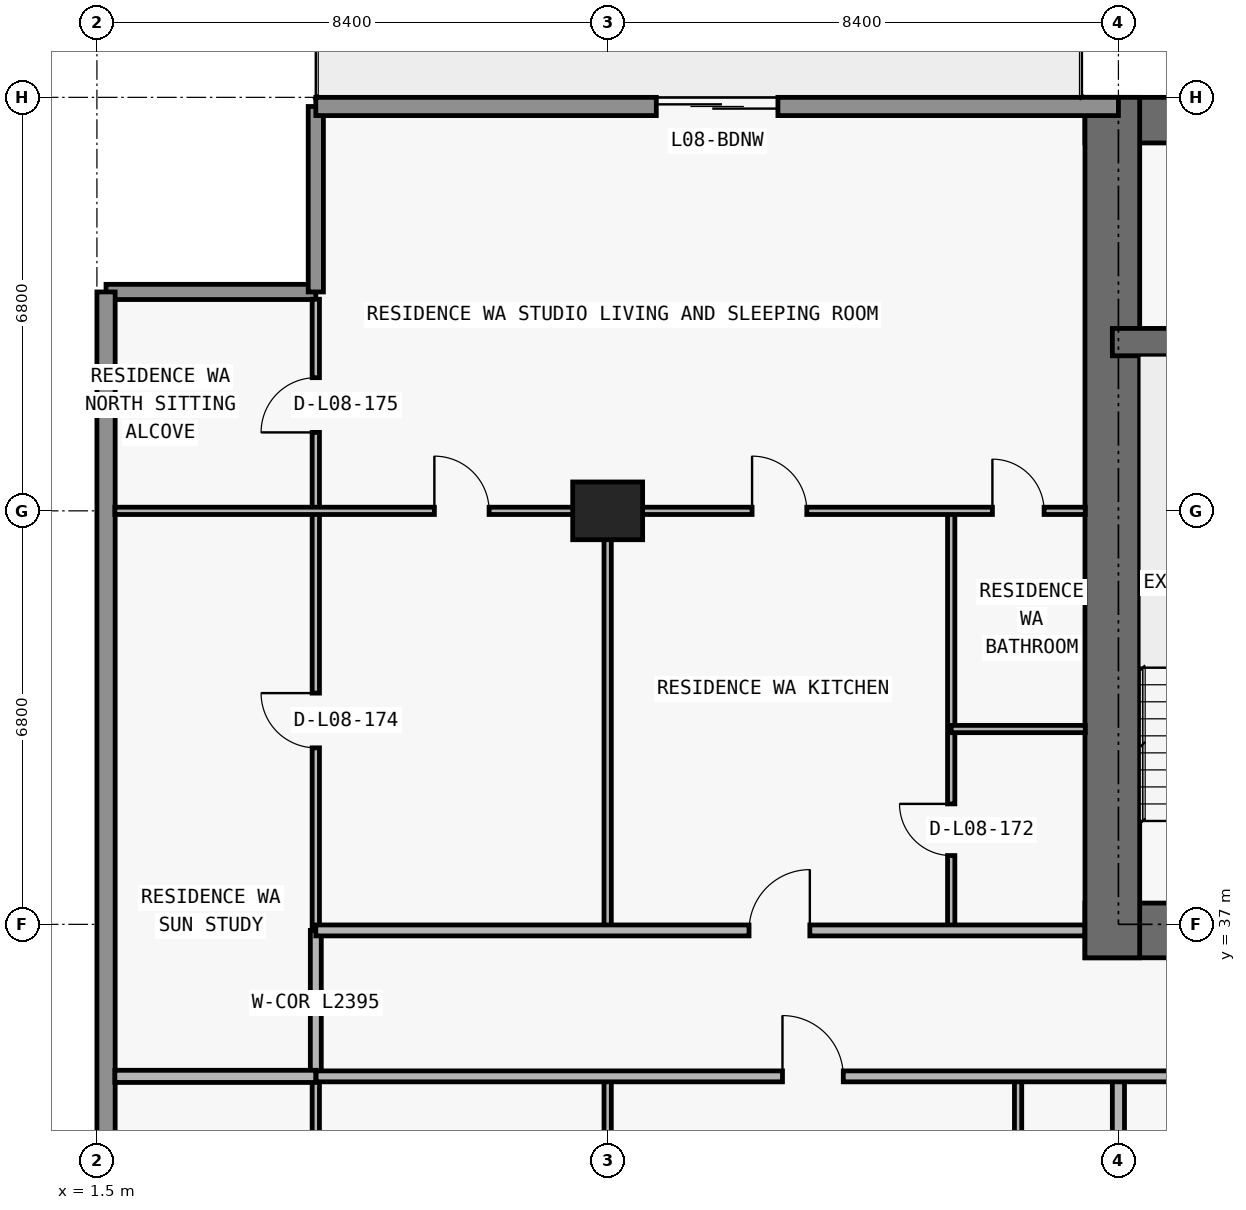
"""IFC4 building model, lengths in metres.
Left out: names, types, materials, properties, quantities, classifications, styles, units other than length and angle.
Written with IfcOpenShell. Run it as: python <this file> out.ifc"""

import sys

from ifc_helpers import new_model, si_unit, direction, frame, frame_2d, origin, origin_2d, place, context, subcontext, project, spatial, rectangle, extrude, element, fill, save


model = new_model("IFC4")
c1 = context("Model", 3, precision=1e-05, world=origin(), true_north=direction((0.0, 1.0)))
c2 = subcontext(c1, "Body", "Model", "MODEL_VIEW")
j1 = project(units=[si_unit("LENGTHUNIT", "METRE"), si_unit("PLANEANGLEUNIT", "RADIAN")], contexts=[c1])
p1 = place(None, origin())
s1 = spatial("IfcSite", under=j1, at=p1, CompositionType="ELEMENT")
p2 = place(p1, origin())
s2 = spatial("IfcBuilding", under=s1, at=p2, CompositionType="ELEMENT")
p3 = place(p2, frame((0.0, 0.0, 36.6)))
s3 = spatial("IfcBuildingStorey", under=s2, at=p3, CompositionType="ELEMENT", Elevation=36.6)
p4 = place(p3, frame((9.9, 43.8, 0.0), z_axis=(0.0, 0.0, 1.0), x_axis=(1.0, 0.0, 0.0)))
e1 = element("IfcColumn", 1, at=p4, inside=s3, PredefinedType="COLUMN", context=c2, shape_type="SweptSolid", body=[
    extrude(rectangle(XDim=1.15, YDim=0.95, at=origin_2d()), origin(), (0.0, 0.0, 1.0), 3.05),
])
p5 = place(p3, frame((17.75, 36.9, 0.0), z_axis=(0.0, 0.0, 1.0), x_axis=(1.0, 0.0, 0.0)))
e2 = element("IfcWall", 2, at=p5, inside=s3, PredefinedType="SHEAR", context=c2, shape_type="SweptSolid", body=[
    extrude(rectangle(XDim=42.3, YDim=0.9, at=frame_2d((21.15, 0.0))), origin(), (0.0, 0.0, 1.0), 3.05),
])
p6 = place(p5, frame((14.55, 0.0, 0.0)))
e3 = element("IfcOpeningElement", 3, at=p6, cuts=e2, PredefinedType="OPENING", context=c2, shape_type="SweptSolid", body=[
    extrude(rectangle(XDim=1.1, YDim=2.15, at=frame_2d((0.55, 1.075))), frame((0.0, 0.46, 0.0), z_axis=(0.0, -1.0, 0.0), x_axis=(1.0, 0.0, 0.0)), (0.0, 0.0, 1.0), 0.92),
])
p7 = place(p5, frame((6.4, 0.0, 0.0)))
e4 = element("IfcOpeningElement", 4, at=p7, cuts=e2, PredefinedType="OPENING", context=c2, shape_type="SweptSolid", body=[
    extrude(rectangle(XDim=1.05, YDim=2.15, at=frame_2d((0.525, 1.075))), frame((0.0, 0.46, 0.0), z_axis=(0.0, -1.0, 0.0), x_axis=(1.0, 0.0, 0.0)), (0.0, 0.0, 1.0), 0.92),
])
p8 = place(p5, frame((34.9, 0.0, 0.0)))
e5 = element("IfcOpeningElement", 5, at=p8, cuts=e2, PredefinedType="OPENING", context=c2, shape_type="SweptSolid", body=[
    extrude(rectangle(XDim=1.05, YDim=2.15, at=frame_2d((0.525, 1.075))), frame((0.0, 0.46, 0.0), z_axis=(0.0, -1.0, 0.0), x_axis=(1.0, 0.0, 0.0)), (0.0, 0.0, 1.0), 0.92),
])
p9 = place(p5, frame((11.012, 0.0, 0.0)))
e6 = element("IfcOpeningElement", 6, at=p9, cuts=e2, PredefinedType="OPENING", context=c2, shape_type="SweptSolid", body=[
    extrude(rectangle(XDim=1.05, YDim=2.15, at=frame_2d((0.525, 1.075))), frame((0.0, 0.46, 0.0), z_axis=(0.0, -1.0, 0.0), x_axis=(1.0, 0.0, 0.0)), (0.0, 0.0, 1.0), 0.92),
])
p10 = place(p5, frame((24.25, 0.0, 0.0)))
e7 = element("IfcOpeningElement", 7, at=p10, cuts=e2, PredefinedType="OPENING", context=c2, shape_type="SweptSolid", body=[
    extrude(rectangle(XDim=1.05, YDim=2.15, at=frame_2d((0.525, 1.075))), frame((0.0, 0.46, 0.0), z_axis=(0.0, -1.0, 0.0), x_axis=(1.0, 0.0, 0.0)), (0.0, 0.0, 1.0), 0.92),
])
p11 = place(p3, frame((17.75, 50.225, 0.0), z_axis=(0.0, 0.0, 1.0), x_axis=(1.0, 0.0, 0.0)))
e8 = element("IfcWall", 8, at=p11, inside=s3, PredefinedType="SHEAR", context=c2, shape_type="SweptSolid", body=[
    extrude(rectangle(XDim=42.3, YDim=0.75, at=frame_2d((21.15, 0.0))), origin(), (0.0, 0.0, 1.0), 3.05),
])
p12 = place(p3, frame((18.2, 36.45, 0.0), z_axis=(0.0, 0.0, 1.0), x_axis=(0.0, 1.0, 0.0)))
e9 = element("IfcWall", 9, at=p12, inside=s3, PredefinedType="SHEAR", context=c2, shape_type="SweptSolid", body=[
    extrude(rectangle(XDim=14.15, YDim=0.9, at=frame_2d((7.075, 0.0))), origin(), (0.0, 0.0, 1.0), 3.05),
])
p13 = place(p3, frame((18.2, 46.575, 0.0), z_axis=(0.0, 0.0, 1.0), x_axis=(1.0, 0.0, 0.0)))
e10 = element("IfcWall", 10, at=p13, inside=s3, PredefinedType="SHEAR", context=c2, shape_type="SweptSolid", body=[
    extrude(rectangle(XDim=41.4, YDim=0.45, at=frame_2d((20.7, 0.0))), origin(), (0.0, 0.0, 1.0), 3.05),
])
p14 = place(p13, frame((7.7, 0.0, 0.0)))
e11 = element("IfcOpeningElement", 11, at=p14, cuts=e10, PredefinedType="OPENING", context=c2, shape_type="SweptSolid", body=[
    extrude(rectangle(XDim=1.0, YDim=2.2, at=frame_2d((0.5, 1.1))), frame((0.0, 0.235, 0.0), z_axis=(0.0, -1.0, 0.0), x_axis=(1.0, 0.0, 0.0)), (0.0, 0.0, 1.0), 0.47),
])
p15 = place(p13, frame((32.725, 0.0, 0.0)))
e12 = element("IfcOpeningElement", 12, at=p15, cuts=e10, PredefinedType="OPENING", context=c2, shape_type="SweptSolid", body=[
    extrude(rectangle(XDim=1.05, YDim=2.15, at=frame_2d((0.525, 1.075))), frame((0.0, 0.235, 0.0), z_axis=(0.0, -1.0, 0.0), x_axis=(1.0, 0.0, 0.0)), (0.0, 0.0, 1.0), 0.47),
])
p16 = place(p3, frame((1.65, 47.4, 0.0), z_axis=(0.0, 0.0, 1.0), x_axis=(1.0, 0.0, 0.0)))
e13 = element("IfcWall", 13, at=p16, inside=s3, PredefinedType="ELEMENTEDWALL", context=c2, shape_type="SweptSolid", body=[
    extrude(rectangle(XDim=3.45, YDim=0.25, at=frame_2d((1.725, 0.0))), origin(), (0.0, 0.0, 1.0), 3.05),
])
p17 = place(p3, frame((5.1, 47.4, 0.0), z_axis=(0.0, 0.0, 1.0), x_axis=(0.0, 1.0, 0.0)))
e14 = element("IfcWall", 14, at=p17, inside=s3, PredefinedType="ELEMENTEDWALL", context=c2, shape_type="SweptSolid", body=[
    extrude(rectangle(XDim=3.05, YDim=0.25, at=frame_2d((1.525, 0.0))), origin(), (0.0, 0.0, 1.0), 3.05),
])
p18 = place(p3, frame((1.65, 26.8, 0.0), z_axis=(0.0, 0.0, 1.0), x_axis=(0.0, 1.0, 0.0)))
e15 = element("IfcWall", 15, at=p18, inside=s3, PredefinedType="STANDARD", context=c2, shape_type="SweptSolid", body=[
    extrude(rectangle(XDim=20.6, YDim=0.3, at=frame_2d((10.3, 0.0))), origin(), (0.0, 0.0, 1.0), 3.05),
])
p19 = place(p3, frame((5.1, 50.45, 0.0), z_axis=(0.0, 0.0, 1.0), x_axis=(1.0, 0.0, 0.0)))
e16 = element("IfcWall", 16, at=p19, inside=s3, PredefinedType="STANDARD", context=c2, shape_type="SweptSolid", body=[
    extrude(rectangle(XDim=13.2, YDim=0.3, at=frame_2d((6.6, 0.0))), origin(), (0.0, 0.0, 1.0), 3.05),
])
p20 = place(p19, frame((5.6, 0.0, 0.0)))
e17 = element("IfcOpeningElement", 17, at=p20, cuts=e16, PredefinedType="OPENING", context=c2, shape_type="SweptSolid", body=[
    extrude(rectangle(XDim=2.0, YDim=2.3, at=frame_2d((1.0, 1.15))), frame((0.0, 0.16, 0.0), z_axis=(0.0, -1.0, 0.0), x_axis=(1.0, 0.0, 0.0)), (0.0, 0.0, 1.0), 0.32),
])
p21 = place(p3, frame((5.1, 27.64, 0.0), z_axis=(0.0, 0.0, 1.0), x_axis=(0.0, 1.0, 0.0)))
e18 = element("IfcWall", 18, at=p21, inside=s3, PredefinedType="PARTITIONING", context=c2, shape_type="SweptSolid", body=[
    extrude(rectangle(XDim=6.86, YDim=0.12, at=frame_2d((3.43, 0.0))), origin(), (0.0, 0.0, 1.0), 3.05),
])
p22 = place(p3, frame((5.1, 34.505, 0.0), z_axis=(0.0, 0.0, 1.0), x_axis=(0.0, 1.0, 0.0)))
e19 = element("IfcWall", 19, at=p22, inside=s3, PredefinedType="PARTITIONING", context=c2, shape_type="SweptSolid", body=[
    extrude(rectangle(XDim=2.395, YDim=0.18, at=frame_2d((1.198, 0.0))), origin(), (0.0, 0.0, 1.0), 3.05),
])
p23 = place(p3, frame((5.1, 36.905, 0.0), z_axis=(0.0, 0.0, 1.0), x_axis=(0.0, 1.0, 0.0)))
e20 = element("IfcWall", 20, at=p23, inside=s3, PredefinedType="PARTITIONING", context=c2, shape_type="SweptSolid", body=[
    extrude(rectangle(XDim=10.375, YDim=0.12, at=frame_2d((5.188, 0.0))), origin(), (0.0, 0.0, 1.0), 3.05),
])
p24 = place(p23, frame((2.998, 0.0, 0.0)))
e21 = element("IfcOpeningElement", 21, at=p24, cuts=e20, PredefinedType="OPENING", context=c2, shape_type="SweptSolid", body=[
    extrude(rectangle(XDim=0.9, YDim=2.15, at=frame_2d((0.45, 1.075))), frame((0.0, 0.07, 0.0), z_axis=(0.0, -1.0, 0.0), x_axis=(1.0, 0.0, 0.0)), (0.0, 0.0, 1.0), 0.14),
])
p25 = place(p23, frame((8.185, 0.0, 0.0)))
e22 = element("IfcOpeningElement", 22, at=p25, cuts=e20, PredefinedType="OPENING", context=c2, shape_type="SweptSolid", body=[
    extrude(rectangle(XDim=0.9, YDim=2.15, at=frame_2d((0.45, 1.075))), frame((0.0, 0.07, 0.0), z_axis=(0.0, -1.0, 0.0), x_axis=(1.0, 0.0, 0.0)), (0.0, 0.0, 1.0), 0.14),
])
p26 = place(p3, frame((9.9, 27.64, 0.0), z_axis=(0.0, 0.0, 1.0), x_axis=(0.0, 1.0, 0.0)))
e23 = element("IfcWall", 23, at=p26, inside=s3, PredefinedType="PARTITIONING", context=c2, shape_type="SweptSolid", body=[
    extrude(rectangle(XDim=6.86, YDim=0.12, at=frame_2d((3.43, 0.0))), origin(), (0.0, 0.0, 1.0), 2.11),
])
p27 = place(p3, frame((9.9, 36.9, 0.0), z_axis=(0.0, 0.0, 1.0), x_axis=(0.0, 1.0, 0.0)))
e24 = element("IfcWall", 24, at=p27, inside=s3, PredefinedType="PARTITIONING", context=c2, shape_type="SweptSolid", body=[
    extrude(rectangle(XDim=6.9, YDim=0.12, at=frame_2d((3.45, 0.0))), origin(), (0.0, 0.0, 1.0), 2.11),
])
p28 = place(p3, frame((15.55, 36.9, 0.0), z_axis=(0.0, 0.0, 1.0), x_axis=(0.0, 1.0, 0.0)))
e25 = element("IfcWall", 25, at=p28, inside=s3, PredefinedType="PARTITIONING", context=c2, shape_type="SweptSolid", body=[
    extrude(rectangle(XDim=6.9, YDim=0.12, at=frame_2d((3.45, 0.0))), origin(), (0.0, 0.0, 1.0), 2.499),
])
p29 = place(p28, frame((1.231, 0.0, 0.0)))
e26 = element("IfcOpeningElement", 26, at=p29, cuts=e25, PredefinedType="OPENING", context=c2, shape_type="SweptSolid", body=[
    extrude(rectangle(XDim=0.85, YDim=2.1, at=frame_2d((0.425, 1.05))), frame((0.0, 0.07, 0.0), z_axis=(0.0, -1.0, 0.0), x_axis=(1.0, 0.0, 0.0)), (0.0, 0.0, 1.0), 0.14),
])
p30 = place(p3, frame((16.65, 27.64, 0.0), z_axis=(0.0, 0.0, 1.0), x_axis=(0.0, 1.0, 0.0)))
e27 = element("IfcWall", 27, at=p30, inside=s3, PredefinedType="PARTITIONING", context=c2, shape_type="SweptSolid", body=[
    extrude(rectangle(XDim=6.86, YDim=0.12, at=frame_2d((3.43, 0.0))), origin(), (0.0, 0.0, 1.0), 3.05),
])
p31 = place(p30, frame((3.005, 0.0, 0.0)))
e28 = element("IfcOpeningElement", 28, at=p31, cuts=e27, PredefinedType="OPENING", context=c2, shape_type="SweptSolid", body=[
    extrude(rectangle(XDim=0.85, YDim=2.1, at=frame_2d((0.425, 1.05))), frame((0.0, 0.07, 0.0), z_axis=(0.0, -1.0, 0.0), x_axis=(1.0, 0.0, 0.0)), (0.0, 0.0, 1.0), 0.14),
])
p32 = place(p3, frame((18.3, 27.64, 0.0), z_axis=(0.0, 0.0, 1.0), x_axis=(0.0, 1.0, 0.0)))
e29 = element("IfcWall", 29, at=p32, inside=s3, PredefinedType="PARTITIONING", context=c2, shape_type="SweptSolid", body=[
    extrude(rectangle(XDim=6.86, YDim=0.2, at=frame_2d((3.43, 0.0))), origin(), (0.0, 0.0, 1.0), 2.11),
])
p33 = place(p3, frame((1.795, 34.5, 0.0), z_axis=(0.0, 0.0, 1.0), x_axis=(1.0, 0.0, 0.0)))
e30 = element("IfcWall", 30, at=p33, inside=s3, PredefinedType="PARTITIONING", context=c2, shape_type="SweptSolid", body=[
    extrude(rectangle(XDim=3.305, YDim=0.2, at=frame_2d((1.653, 0.0))), origin(), (0.0, 0.0, 1.0), 3.05),
])
p34 = place(p3, frame((5.105, 34.5, 0.0), z_axis=(0.0, 0.0, 1.0), x_axis=(1.0, 0.0, 0.0)))
e31 = element("IfcWall", 31, at=p34, inside=s3, PredefinedType="PARTITIONING", context=c2, shape_type="SweptSolid", body=[
    extrude(rectangle(XDim=50.781, YDim=0.18, at=frame_2d((25.391, 0.0))), origin(), (0.0, 0.0, 1.0), 3.05),
])
p35 = place(p34, frame((7.67, 0.0, 0.0)))
e32 = element("IfcOpeningElement", 32, at=p35, cuts=e31, PredefinedType="OPENING", context=c2, shape_type="SweptSolid", body=[
    extrude(rectangle(XDim=1.0, YDim=2.2, at=frame_2d((0.5, 1.1))), frame((0.0, 0.1, 0.0), z_axis=(0.0, -1.0, 0.0), x_axis=(1.0, 0.0, 0.0)), (0.0, 0.0, 1.0), 0.2),
])
p36 = place(p34, frame((16.07, 0.0, 0.0)))
e33 = element("IfcOpeningElement", 33, at=p36, cuts=e31, PredefinedType="OPENING", context=c2, shape_type="SweptSolid", body=[
    extrude(rectangle(XDim=1.0, YDim=2.2, at=frame_2d((0.5, 1.1))), frame((0.0, 0.1, 0.0), z_axis=(0.0, -1.0, 0.0), x_axis=(1.0, 0.0, 0.0)), (0.0, 0.0, 1.0), 0.2),
])
p37 = place(p34, frame((24.47, 0.0, 0.0)))
e34 = element("IfcOpeningElement", 34, at=p37, cuts=e31, PredefinedType="OPENING", context=c2, shape_type="SweptSolid", body=[
    extrude(rectangle(XDim=1.0, YDim=2.2, at=frame_2d((0.5, 1.1))), frame((0.0, 0.1, 0.0), z_axis=(0.0, -1.0, 0.0), x_axis=(1.0, 0.0, 0.0)), (0.0, 0.0, 1.0), 0.2),
])
p38 = place(p34, frame((32.545, 0.0, 0.0)))
e35 = element("IfcOpeningElement", 35, at=p38, cuts=e31, PredefinedType="OPENING", context=c2, shape_type="SweptSolid", body=[
    extrude(rectangle(XDim=1.0, YDim=2.2, at=frame_2d((0.5, 1.1))), frame((0.0, 0.1, 0.0), z_axis=(0.0, -1.0, 0.0), x_axis=(1.0, 0.0, 0.0)), (0.0, 0.0, 1.0), 0.2),
])
p39 = place(p34, frame((47.888, 0.0, 0.0)))
e36 = element("IfcOpeningElement", 36, at=p39, cuts=e31, PredefinedType="OPENING", context=c2, shape_type="SweptSolid", body=[
    extrude(rectangle(XDim=1.0, YDim=2.2, at=frame_2d((0.5, 1.1))), frame((0.0, 0.1, 0.0), z_axis=(0.0, -1.0, 0.0), x_axis=(1.0, 0.0, 0.0)), (0.0, 0.0, 1.0), 0.2),
])
p40 = place(p3, frame((5.1, 36.9, 0.0), z_axis=(0.0, 0.0, 1.0), x_axis=(1.0, 0.0, 0.0)))
e37 = element("IfcWall", 37, at=p40, inside=s3, PredefinedType="PARTITIONING", context=c2, shape_type="SweptSolid", body=[
    extrude(rectangle(XDim=12.645, YDim=0.18, at=frame_2d((6.323, 0.0))), origin(), (0.0, 0.0, 1.0), 3.05),
])
p41 = place(p40, frame((7.125, 0.0, 0.0)))
e38 = element("IfcOpeningElement", 38, at=p41, cuts=e37, PredefinedType="OPENING", context=c2, shape_type="SweptSolid", body=[
    extrude(rectangle(XDim=1.0, YDim=2.2, at=frame_2d((0.5, 1.1))), frame((0.0, 0.1, 0.0), z_axis=(0.0, -1.0, 0.0), x_axis=(1.0, 0.0, 0.0)), (0.0, 0.0, 1.0), 0.2),
])
p42 = place(p3, frame((15.55, 40.212, 0.0), z_axis=(0.0, 0.0, 1.0), x_axis=(1.0, 0.0, 0.0)))
e39 = element("IfcWall", 39, at=p42, inside=s3, PredefinedType="PARTITIONING", context=c2, shape_type="SweptSolid", body=[
    extrude(rectangle(XDim=2.205, YDim=0.12, at=frame_2d((1.103, 0.0))), origin(), (0.0, 0.0, 1.0), 3.05),
])
p43 = place(p3, frame((1.795, 43.8, 0.0), z_axis=(0.0, 0.0, 1.0), x_axis=(1.0, 0.0, 0.0)))
e40 = element("IfcWall", 40, at=p43, inside=s3, PredefinedType="PARTITIONING", context=c2, shape_type="SweptSolid", body=[
    extrude(rectangle(XDim=15.96, YDim=0.12, at=frame_2d((7.98, 0.0))), origin(), (0.0, 0.0, 1.0), 2.339),
])
p44 = place(p43, frame((5.255, 0.0, 0.0)))
e41 = element("IfcOpeningElement", 41, at=p44, cuts=e40, PredefinedType="OPENING", context=c2, shape_type="SweptSolid", body=[
    extrude(rectangle(XDim=0.9, YDim=2.15, at=frame_2d((0.45, 1.075))), frame((0.0, 0.07, 0.0), z_axis=(0.0, -1.0, 0.0), x_axis=(1.0, 0.0, 0.0)), (0.0, 0.0, 1.0), 0.14),
])
p45 = place(p43, frame((10.48, 0.0, 0.0)))
e42 = element("IfcOpeningElement", 42, at=p45, cuts=e40, PredefinedType="OPENING", context=c2, shape_type="SweptSolid", body=[
    extrude(rectangle(XDim=0.9, YDim=2.15, at=frame_2d((0.45, 1.075))), frame((0.0, 0.07, 0.0), z_axis=(0.0, -1.0, 0.0), x_axis=(1.0, 0.0, 0.0)), (0.0, 0.0, 1.0), 0.14),
])
p46 = place(p43, frame((14.433, 0.0, 0.0)))
e43 = element("IfcOpeningElement", 43, at=p46, cuts=e40, PredefinedType="OPENING", context=c2, shape_type="SweptSolid", body=[
    extrude(rectangle(XDim=0.85, YDim=2.1, at=frame_2d((0.425, 1.05))), frame((0.0, 0.07, 0.0), z_axis=(0.0, -1.0, 0.0), x_axis=(1.0, 0.0, 0.0)), (0.0, 0.0, 1.0), 0.14),
])
p47 = place(p20, origin())
e44 = element("IfcDoor", 44, at=p47, inside=s3, OperationType="DOUBLE_DOOR_SLIDING", PredefinedType="DOOR", context=c2, shape_type="SweptSolid", body=[
    extrude(rectangle(XDim=2.0, YDim=2.3, at=frame_2d((1.0, 1.15))), frame((0.0, 0.025, 0.0), z_axis=(0.0, -1.0, 0.0), x_axis=(1.0, 0.0, 0.0)), (0.0, 0.0, 1.0), 0.05),
])
fill(e17, e44)
p48 = place(p35, origin())
e45 = element("IfcDoor", 45, at=p48, inside=s3, OperationType="SINGLE_SWING_LEFT", PredefinedType="DOOR", context=c2, shape_type="SweptSolid", body=[
    extrude(rectangle(XDim=1.0, YDim=2.2, at=frame_2d((0.5, 1.1))), frame((0.0, 0.025, 0.0), z_axis=(0.0, -1.0, 0.0), x_axis=(1.0, 0.0, 0.0)), (0.0, 0.0, 1.0), 0.05),
])
fill(e32, e45)
p49 = place(p44, origin())
e46 = element("IfcDoor", 46, at=p49, inside=s3, OperationType="SINGLE_SWING_LEFT", PredefinedType="DOOR", context=c2, shape_type="SweptSolid", body=[
    extrude(rectangle(XDim=0.9, YDim=2.15, at=frame_2d((0.45, 1.075))), frame((0.0, 0.025, 0.0), z_axis=(0.0, -1.0, 0.0), x_axis=(1.0, 0.0, 0.0)), (0.0, 0.0, 1.0), 0.05),
])
fill(e41, e46)
p50 = place(p41, origin())
e47 = element("IfcDoor", 47, at=p50, inside=s3, OperationType="SINGLE_SWING_RIGHT", PredefinedType="DOOR", context=c2, shape_type="SweptSolid", body=[
    extrude(rectangle(XDim=1.0, YDim=2.2, at=frame_2d((0.5, 1.1))), frame((0.0, 0.025, 0.0), z_axis=(0.0, -1.0, 0.0), x_axis=(1.0, 0.0, 0.0)), (0.0, 0.0, 1.0), 0.05),
])
fill(e38, e47)
p51 = place(p45, origin())
e48 = element("IfcDoor", 48, at=p51, inside=s3, OperationType="SINGLE_SWING_LEFT", PredefinedType="DOOR", context=c2, shape_type="SweptSolid", body=[
    extrude(rectangle(XDim=0.9, YDim=2.15, at=frame_2d((0.45, 1.075))), frame((0.0, 0.025, 0.0), z_axis=(0.0, -1.0, 0.0), x_axis=(1.0, 0.0, 0.0)), (0.0, 0.0, 1.0), 0.05),
])
fill(e42, e48)
p52 = place(p29, origin())
e49 = element("IfcDoor", 49, at=p52, inside=s3, OperationType="SINGLE_SWING_RIGHT", PredefinedType="DOOR", context=c2, shape_type="SweptSolid", body=[
    extrude(rectangle(XDim=0.85, YDim=2.1, at=frame_2d((0.425, 1.05))), frame((0.0, 0.025, 0.0), z_axis=(0.0, -1.0, 0.0), x_axis=(1.0, 0.0, 0.0)), (0.0, 0.0, 1.0), 0.05),
])
fill(e26, e49)
p53 = place(p46, origin())
e50 = element("IfcDoor", 50, at=p53, inside=s3, OperationType="SINGLE_SWING_LEFT", PredefinedType="DOOR", context=c2, shape_type="SweptSolid", body=[
    extrude(rectangle(XDim=0.85, YDim=2.1, at=frame_2d((0.425, 1.05))), frame((0.0, 0.025, 0.0), z_axis=(0.0, -1.0, 0.0), x_axis=(1.0, 0.0, 0.0)), (0.0, 0.0, 1.0), 0.05),
])
fill(e43, e50)
p54 = place(p24, origin())
e51 = element("IfcDoor", 51, at=p54, inside=s3, OperationType="SINGLE_SWING_RIGHT", PredefinedType="DOOR", context=c2, shape_type="SweptSolid", body=[
    extrude(rectangle(XDim=0.9, YDim=2.15, at=frame_2d((0.45, 1.075))), frame((0.0, 0.025, 0.0), z_axis=(0.0, -1.0, 0.0), x_axis=(1.0, 0.0, 0.0)), (0.0, 0.0, 1.0), 0.05),
])
fill(e21, e51)
p55 = place(p25, origin())
e52 = element("IfcDoor", 52, at=p55, inside=s3, OperationType="SINGLE_SWING_LEFT", PredefinedType="DOOR", context=c2, shape_type="SweptSolid", body=[
    extrude(rectangle(XDim=0.9, YDim=2.15, at=frame_2d((0.45, 1.075))), frame((0.0, 0.025, 0.0), z_axis=(0.0, -1.0, 0.0), x_axis=(1.0, 0.0, 0.0)), (0.0, 0.0, 1.0), 0.05),
])
fill(e22, e52)
save(model, sys.argv[1])
